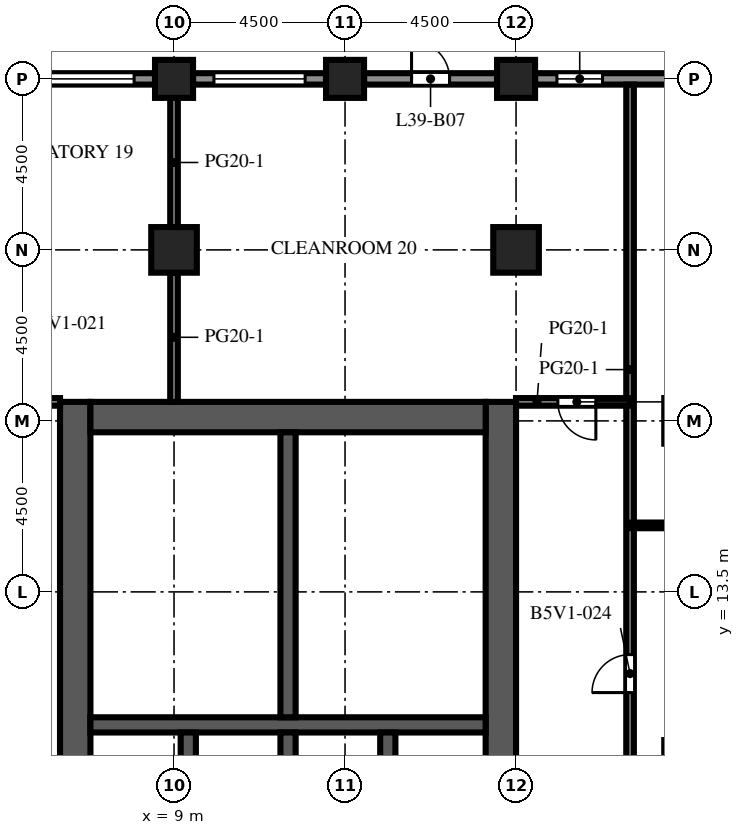
"""IFC4 building model, lengths in metres.
Left out: names, types, materials, properties, quantities, classifications, styles, units other than length and angle.
Written with IfcOpenShell. Run it as: python <this file> out.ifc"""

import sys

from ifc_helpers import new_model, si_unit, direction, frame, frame_2d, origin, origin_2d, place, context, subcontext, project, spatial, rectangle, extrude, element, fill, save


model = new_model("IFC4")
c1 = context("Model", 3, precision=1e-05, world=origin(), true_north=direction((0.0, 1.0)))
c2 = subcontext(c1, "Body", "Model", "MODEL_VIEW")
j1 = project(units=[si_unit("LENGTHUNIT", "METRE"), si_unit("PLANEANGLEUNIT", "RADIAN")], contexts=[c1])
p1 = place(None, origin())
s1 = spatial("IfcSite", under=j1, at=p1, CompositionType="ELEMENT")
p2 = place(p1, origin())
s2 = spatial("IfcBuilding", under=s1, at=p2, CompositionType="ELEMENT")
p3 = place(p2, frame((0.0, 0.0, 173.2)))
s3 = spatial("IfcBuildingStorey", under=s2, at=p3, CompositionType="ELEMENT", Elevation=173.2)
for number, where, z_axis, x_axis in (
    (1, (9.0, 27.0, 0.0), (0.0, 0.0, 1.0), (1.0, 0.0, 0.0)),
    (2, (13.5, 27.0, 0.0), (0.0, 0.0, 1.0), (1.0, 0.0, 0.0)),
    (3, (18.0, 27.0, 0.0), (0.0, 0.0, 1.0), (1.0, 0.0, 0.0)),
):
    element("IfcColumn", number, at=place(p3, frame(where, z_axis=z_axis, x_axis=x_axis)), inside=s3, PredefinedType="COLUMN", context=c2, shape_type="SweptSolid", body=[
        extrude(rectangle(XDim=1.0, YDim=1.0, at=origin_2d()), origin(), (0.0, 0.0, 1.0), 4.1),
    ])
for number, where, z_axis, x_axis in (
    (4, (9.0, 22.5, 0.0), (0.0, 0.0, 1.0), (1.0, 0.0, 0.0)),
    (5, (18.0, 22.5, 0.0), (0.0, 0.0, 1.0), (1.0, 0.0, 0.0)),
):
    element("IfcColumn", number, at=place(p3, frame(where, z_axis=z_axis, x_axis=x_axis)), inside=s3, PredefinedType="COLUMN", context=c2, shape_type="SweptSolid", body=[
        extrude(rectangle(XDim=1.2, YDim=1.2, at=origin_2d()), origin(), (0.0, 0.0, 1.0), 4.1),
    ])
p4 = place(p3, frame((6.4, -9.0, 0.0), z_axis=(0.0, 0.0, 1.0), x_axis=(0.0, 1.0, 0.0)))
e6 = element("IfcWall", 6, at=p4, inside=s3, PredefinedType="SHEAR", context=c2, shape_type="SweptSolid", body=[
    extrude(rectangle(XDim=27.5, YDim=0.8, at=frame_2d((13.75, 0.0))), origin(), (0.0, 0.0, 1.0), 4.1),
])
p5 = place(p4, frame((12.55, 0.0, 0.0)))
e7 = element("IfcOpeningElement", 7, at=p5, cuts=e6, PredefinedType="OPENING", context=c2, shape_type="SweptSolid", body=[
    extrude(rectangle(XDim=2.4, YDim=2.4, at=frame_2d((1.2, 1.2))), frame((0.0, 0.41, 0.0), z_axis=(0.0, -1.0, 0.0), x_axis=(1.0, 0.0, 0.0)), (0.0, 0.0, 1.0), 0.82),
])
p6 = place(p4, frame((3.95, 0.0, 0.0)))
e8 = element("IfcOpeningElement", 8, at=p6, cuts=e6, PredefinedType="OPENING", context=c2, shape_type="SweptSolid", body=[
    extrude(rectangle(XDim=1.2, YDim=2.1, at=frame_2d((0.6, 1.05))), frame((0.0, 0.41, 0.0), z_axis=(0.0, -1.0, 0.0), x_axis=(1.0, 0.0, 0.0)), (0.0, 0.0, 1.0), 0.82),
])
p7 = place(p4, frame((22.35, 0.0, 0.0)))
e9 = element("IfcOpeningElement", 9, at=p7, cuts=e6, PredefinedType="OPENING", context=c2, shape_type="SweptSolid", body=[
    extrude(rectangle(XDim=1.2, YDim=2.1, at=frame_2d((0.6, 1.05))), frame((0.0, 0.41, 0.0), z_axis=(0.0, -1.0, 0.0), x_axis=(1.0, 0.0, 0.0)), (0.0, 0.0, 1.0), 0.82),
])
p8 = place(p3, frame((17.6, -9.0, 0.0), z_axis=(0.0, 0.0, 1.0), x_axis=(0.0, 1.0, 0.0)))
e10 = element("IfcWall", 10, at=p8, inside=s3, PredefinedType="SHEAR", context=c2, shape_type="SweptSolid", body=[
    extrude(rectangle(XDim=27.5, YDim=0.8, at=frame_2d((13.75, 0.0))), origin(), (0.0, 0.0, 1.0), 4.1),
])
p9 = place(p8, frame((12.55, 0.0, 0.0)))
e11 = element("IfcOpeningElement", 11, at=p9, cuts=e10, PredefinedType="OPENING", context=c2, shape_type="SweptSolid", body=[
    extrude(rectangle(XDim=2.4, YDim=2.4, at=frame_2d((1.2, 1.2))), frame((0.0, 0.41, 0.0), z_axis=(0.0, -1.0, 0.0), x_axis=(1.0, 0.0, 0.0)), (0.0, 0.0, 1.0), 0.82),
])
p10 = place(p8, frame((6.825, 0.0, 0.0)))
e12 = element("IfcOpeningElement", 12, at=p10, cuts=e10, PredefinedType="OPENING", context=c2, shape_type="SweptSolid", body=[
    extrude(rectangle(XDim=1.2, YDim=2.1, at=frame_2d((0.6, 1.05))), frame((0.0, 0.41, 0.0), z_axis=(0.0, -1.0, 0.0), x_axis=(1.0, 0.0, 0.0)), (0.0, 0.0, 1.0), 0.82),
])
p11 = place(p8, frame((19.475, 0.0, 0.0)))
e13 = element("IfcOpeningElement", 13, at=p11, cuts=e10, PredefinedType="OPENING", context=c2, shape_type="SweptSolid", body=[
    extrude(rectangle(XDim=1.2, YDim=2.1, at=frame_2d((0.6, 1.05))), frame((0.0, 0.41, 0.0), z_axis=(0.0, -1.0, 0.0), x_axis=(1.0, 0.0, 0.0)), (0.0, 0.0, 1.0), 0.82),
])
p12 = place(p3, frame((6.8, 18.1, 0.0), z_axis=(0.0, 0.0, 1.0), x_axis=(1.0, 0.0, 0.0)))
e14 = element("IfcWall", 14, at=p12, inside=s3, PredefinedType="SHEAR", context=c2, shape_type="SweptSolid", body=[
    extrude(rectangle(XDim=10.4, YDim=0.8, at=frame_2d((5.2, 0.0))), origin(), (0.0, 0.0, 1.0), 4.1),
])
p13 = place(p3, frame((6.8, 10.0, 0.0), z_axis=(0.0, 0.0, 1.0), x_axis=(1.0, 0.0, 0.0)))
e15 = element("IfcWall", 15, at=p13, inside=s3, PredefinedType="SHEAR", context=c2, shape_type="SweptSolid", body=[
    extrude(rectangle(XDim=10.4, YDim=0.4, at=frame_2d((5.2, 0.0))), origin(), (0.0, 0.0, 1.0), 4.1),
])
for number, where, z_axis, x_axis in (
    (16, (9.375, 6.9, 0.0), (0.0, 0.0, 1.0), (0.0, 1.0, 0.0)),
    (17, (12.0, 6.9, 0.0), (0.0, 0.0, 1.0), (0.0, 1.0, 0.0)),
    (18, (14.625, 6.9, 0.0), (0.0, 0.0, 1.0), (0.0, 1.0, 0.0)),
):
    element("IfcWall", number, at=place(p3, frame(where, z_axis=z_axis, x_axis=x_axis)), inside=s3, PredefinedType="SHEAR", context=c2, shape_type="SweptSolid", body=[
        extrude(rectangle(XDim=2.9, YDim=0.4, at=frame_2d((1.45, 0.0))), origin(), (0.0, 0.0, 1.0), 4.1),
    ])
p14 = place(p3, frame((12.0, 10.2, 0.0), z_axis=(0.0, 0.0, 1.0), x_axis=(0.0, 1.0, 0.0)))
e19 = element("IfcWall", 19, at=p14, inside=s3, PredefinedType="SHEAR", context=c2, shape_type="SweptSolid", body=[
    extrude(rectangle(XDim=7.5, YDim=0.4, at=frame_2d((3.75, 0.0))), origin(), (0.0, 0.0, 1.0), 4.1),
])
p15 = place(p3, frame((18.5, 27.0, 0.0), z_axis=(0.0, 0.0, 1.0), x_axis=(1.0, 0.0, 0.0)))
e20 = element("IfcWall", 20, at=p15, inside=s3, PredefinedType="SOLIDWALL", context=c2, shape_type="SweptSolid", body=[
    extrude(rectangle(XDim=3.5, YDim=0.3, at=frame_2d((1.75, 0.0))), origin(), (0.0, 0.0, 1.0), 2.85),
])
p16 = place(p15, frame((0.575, 0.0, 0.8)))
e21 = element("IfcOpeningElement", 21, at=p16, cuts=e20, PredefinedType="OPENING", context=c2, shape_type="SweptSolid", body=[
    extrude(rectangle(XDim=1.2, YDim=1.7, at=frame_2d((0.6, 0.85))), frame((0.0, 0.16, 0.0), z_axis=(0.0, -1.0, 0.0), x_axis=(1.0, 0.0, 0.0)), (0.0, 0.0, 1.0), 0.32),
])
p17 = place(p3, frame((14.0, 27.0, 0.0), z_axis=(0.0, 0.0, 1.0), x_axis=(1.0, 0.0, 0.0)))
e22 = element("IfcWall", 22, at=p17, inside=s3, PredefinedType="SOLIDWALL", context=c2, shape_type="SweptSolid", body=[
    extrude(rectangle(XDim=3.5, YDim=0.3, at=frame_2d((1.75, 0.0))), origin(), (0.0, 0.0, 1.0), 2.85),
])
p18 = place(p17, frame((1.25, 0.0, 0.0)))
e23 = element("IfcOpeningElement", 23, at=p18, cuts=e22, PredefinedType="OPENING", context=c2, shape_type="SweptSolid", body=[
    extrude(rectangle(XDim=1.0, YDim=2.2, at=frame_2d((0.5, 1.1))), frame((0.0, 0.16, 0.0), z_axis=(0.0, -1.0, 0.0), x_axis=(1.0, 0.0, 0.0)), (0.0, 0.0, 1.0), 0.32),
])
p19 = place(p3, frame((9.5, 27.0, 0.0), z_axis=(0.0, 0.0, 1.0), x_axis=(1.0, 0.0, 0.0)))
e24 = element("IfcWall", 24, at=p19, inside=s3, PredefinedType="SOLIDWALL", context=c2, shape_type="SweptSolid", body=[
    extrude(rectangle(XDim=3.5, YDim=0.3, at=frame_2d((1.75, 0.0))), origin(), (0.0, 0.0, 1.0), 2.85),
])
p20 = place(p19, frame((0.55, 0.0, 0.8)))
e25 = element("IfcOpeningElement", 25, at=p20, cuts=e24, PredefinedType="OPENING", context=c2, shape_type="SweptSolid", body=[
    extrude(rectangle(XDim=2.4, YDim=1.7, at=frame_2d((1.2, 0.85))), frame((0.0, 0.16, 0.0), z_axis=(0.0, -1.0, 0.0), x_axis=(1.0, 0.0, 0.0)), (0.0, 0.0, 1.0), 0.32),
])
p21 = place(p3, frame((5.0, 27.0, 0.0), z_axis=(0.0, 0.0, 1.0), x_axis=(1.0, 0.0, 0.0)))
e26 = element("IfcWall", 26, at=p21, inside=s3, PredefinedType="SOLIDWALL", context=c2, shape_type="SweptSolid", body=[
    extrude(rectangle(XDim=3.5, YDim=0.3, at=frame_2d((1.75, 0.0))), origin(), (0.0, 0.0, 1.0), 2.85),
])
p22 = place(p21, frame((0.55, 0.0, 0.8)))
e27 = element("IfcOpeningElement", 27, at=p22, cuts=e26, PredefinedType="OPENING", context=c2, shape_type="SweptSolid", body=[
    extrude(rectangle(XDim=2.4, YDim=1.7, at=frame_2d((1.2, 0.85))), frame((0.0, 0.16, 0.0), z_axis=(0.0, -1.0, 0.0), x_axis=(1.0, 0.0, 0.0)), (0.0, 0.0, 1.0), 0.32),
])
p23 = place(p3, frame((8.2, 10.2, 0.0), z_axis=(0.0, 0.0, 1.0), x_axis=(0.0, 1.0, 0.0)))
e28 = element("IfcWall", 28, at=p23, inside=s3, PredefinedType="PARTITIONING", context=c2, shape_type="SweptSolid", body=[
    extrude(rectangle(XDim=2.25, YDim=0.1, at=frame_2d((1.125, 0.0))), origin(), (0.0, 0.0, 1.0), 3.65),
])
p24 = place(p23, frame((0.625, 0.0, 0.0)))
e29 = element("IfcOpeningElement", 29, at=p24, cuts=e28, PredefinedType="OPENING", context=c2, shape_type="SweptSolid", body=[
    extrude(rectangle(XDim=1.0, YDim=2.1, at=frame_2d((0.5, 1.05))), frame((0.0, 0.06, 0.0), z_axis=(0.0, -1.0, 0.0), x_axis=(1.0, 0.0, 0.0)), (0.0, 0.0, 1.0), 0.12),
])
p25 = place(p3, frame((8.2, 12.45, 0.0), z_axis=(0.0, 0.0, 1.0), x_axis=(0.0, 1.0, 0.0)))
e30 = element("IfcWall", 30, at=p25, inside=s3, PredefinedType="PARTITIONING", context=c2, shape_type="SweptSolid", body=[
    extrude(rectangle(XDim=2.4, YDim=0.1, at=frame_2d((1.2, 0.0))), origin(), (0.0, 0.0, 1.0), 3.65),
])
p26 = place(p25, frame((0.7, 0.0, 0.0)))
e31 = element("IfcOpeningElement", 31, at=p26, cuts=e30, PredefinedType="OPENING", context=c2, shape_type="SweptSolid", body=[
    extrude(rectangle(XDim=1.0, YDim=2.1, at=frame_2d((0.5, 1.05))), frame((0.0, 0.06, 0.0), z_axis=(0.0, -1.0, 0.0), x_axis=(1.0, 0.0, 0.0)), (0.0, 0.0, 1.0), 0.12),
])
p27 = place(p3, frame((8.2, 14.85, 0.0), z_axis=(0.0, 0.0, 1.0), x_axis=(0.0, 1.0, 0.0)))
e32 = element("IfcWall", 32, at=p27, inside=s3, PredefinedType="PARTITIONING", context=c2, shape_type="SweptSolid", body=[
    extrude(rectangle(XDim=2.85, YDim=0.1, at=frame_2d((1.425, 0.0))), origin(), (0.0, 0.0, 1.0), 3.65),
])
p28 = place(p27, frame((0.925, 0.0, 0.0)))
e33 = element("IfcOpeningElement", 33, at=p28, cuts=e32, PredefinedType="OPENING", context=c2, shape_type="SweptSolid", body=[
    extrude(rectangle(XDim=1.0, YDim=2.1, at=frame_2d((0.5, 1.05))), frame((0.0, 0.06, 0.0), z_axis=(0.0, -1.0, 0.0), x_axis=(1.0, 0.0, 0.0)), (0.0, 0.0, 1.0), 0.12),
])
for number, where, z_axis, x_axis in (
    (34, (8.2, 12.45, 0.0), (0.0, 0.0, 1.0), (1.0, 0.0, 0.0)),
    (35, (8.2, 14.85, 0.0), (0.0, 0.0, 1.0), (1.0, 0.0, 0.0)),
):
    element("IfcWall", number, at=place(p3, frame(where, z_axis=z_axis, x_axis=x_axis)), inside=s3, PredefinedType="PARTITIONING", context=c2, shape_type="SweptSolid", body=[
        extrude(rectangle(XDim=3.6, YDim=0.1, at=frame_2d((1.8, 0.0))), origin(), (0.0, 0.0, 1.0), 3.65),
    ])
for number, where, z_axis, x_axis in (
    (36, (9.0, 18.5, 0.0), (0.0, 0.0, 1.0), (0.0, 1.0, 0.0)),
    (37, (9.0, 23.1, 0.0), (0.0, 0.0, 1.0), (0.0, 1.0, 0.0)),
):
    element("IfcWall", number, at=place(p3, frame(where, z_axis=z_axis, x_axis=x_axis)), inside=s3, PredefinedType="PARTITIONING", context=c2, shape_type="SweptSolid", body=[
        extrude(rectangle(XDim=3.4, YDim=0.2, at=frame_2d((1.7, 0.0))), origin(), (0.0, 0.0, 1.0), 3.65),
    ])
p29 = place(p3, frame((21.0, 26.85, 0.0), z_axis=(0.0, 0.0, 1.0), x_axis=(0.0, -1.0, 0.0)))
e38 = element("IfcWall", 38, at=p29, inside=s3, PredefinedType="PARTITIONING", context=c2, shape_type="SweptSolid", body=[
    extrude(rectangle(XDim=20.6, YDim=0.2, at=frame_2d((10.3, 0.0))), origin(), (0.0, 0.0, 1.0), 3.65),
])
p30 = place(p29, frame((15.0, 0.0, 0.0)))
e39 = element("IfcOpeningElement", 39, at=p30, cuts=e38, PredefinedType="OPENING", context=c2, shape_type="SweptSolid", body=[
    extrude(rectangle(XDim=1.0, YDim=2.1, at=frame_2d((0.5, 1.05))), frame((0.0, 0.11, 0.0), z_axis=(0.0, -1.0, 0.0), x_axis=(1.0, 0.0, 0.0)), (0.0, 0.0, 1.0), 0.22),
])
p31 = place(p3, frame((21.0, 15.25, 0.0), z_axis=(0.0, 0.0, 1.0), x_axis=(1.0, 0.0, 0.0)))
e40 = element("IfcWall", 40, at=p31, inside=s3, PredefinedType="PARTITIONING", context=c2, shape_type="SweptSolid", body=[
    extrude(rectangle(XDim=5.85, YDim=0.15, at=frame_2d((2.925, 0.0))), origin(), (0.0, 0.0, 1.0), 3.65),
])
p32 = place(p31, frame((3.1, 0.0, 0.0)))
e41 = element("IfcOpeningElement", 41, at=p32, cuts=e40, PredefinedType="OPENING", context=c2, shape_type="SweptSolid", body=[
    extrude(rectangle(XDim=1.0, YDim=2.1, at=frame_2d((0.5, 1.05))), frame((0.0, 0.085, 0.0), z_axis=(0.0, -1.0, 0.0), x_axis=(1.0, 0.0, 0.0)), (0.0, 0.0, 1.0), 0.17),
])
p33 = place(p3, frame((1.5, 18.5, 0.0), z_axis=(0.0, 0.0, 1.0), x_axis=(1.0, 0.0, 0.0)))
e42 = element("IfcWall", 42, at=p33, inside=s3, PredefinedType="PARTITIONING", context=c2, shape_type="SweptSolid", body=[
    extrude(rectangle(XDim=4.5, YDim=0.2, at=frame_2d((2.25, 0.0))), origin(), (0.0, 0.0, 1.0), 3.65),
])
p34 = place(p33, frame((2.1, 0.0, 0.0)))
e43 = element("IfcOpeningElement", 43, at=p34, cuts=e42, PredefinedType="OPENING", context=c2, shape_type="SweptSolid", body=[
    extrude(rectangle(XDim=1.0, YDim=2.1, at=frame_2d((0.5, 1.05))), frame((0.0, 0.11, 0.0), z_axis=(0.0, -1.0, 0.0), x_axis=(1.0, 0.0, 0.0)), (0.0, 0.0, 1.0), 0.22),
])
p35 = place(p3, frame((18.0, 18.5, 0.0), z_axis=(0.0, 0.0, 1.0), x_axis=(1.0, 0.0, 0.0)))
e44 = element("IfcWall", 44, at=p35, inside=s3, PredefinedType="PARTITIONING", context=c2, shape_type="SweptSolid", body=[
    extrude(rectangle(XDim=3.0, YDim=0.2, at=frame_2d((1.5, 0.0))), origin(), (0.0, 0.0, 1.0), 3.65),
])
p36 = place(p35, frame((1.1, 0.0, 0.0)))
e45 = element("IfcOpeningElement", 45, at=p36, cuts=e44, PredefinedType="OPENING", context=c2, shape_type="SweptSolid", body=[
    extrude(rectangle(XDim=1.0, YDim=2.1, at=frame_2d((0.5, 1.05))), frame((0.0, 0.11, 0.0), z_axis=(0.0, -1.0, 0.0), x_axis=(1.0, 0.0, 0.0)), (0.0, 0.0, 1.0), 0.22),
])
p37 = place(p16, origin())
e46 = element("IfcWindow", 46, at=p37, inside=s3, PartitioningType="SINGLE_PANEL", PredefinedType="WINDOW", context=c2, shape_type="SweptSolid", body=[
    extrude(rectangle(XDim=1.2, YDim=1.7, at=frame_2d((0.6, 0.85))), frame((0.0, 0.03, 0.0), z_axis=(0.0, -1.0, 0.0), x_axis=(1.0, 0.0, 0.0)), (0.0, 0.0, 1.0), 0.06),
])
fill(e21, e46)
p38 = place(p18, origin())
e47 = element("IfcDoor", 47, at=p38, inside=s3, OperationType="SINGLE_SWING_LEFT", PredefinedType="DOOR", context=c2, shape_type="SweptSolid", body=[
    extrude(rectangle(XDim=1.0, YDim=2.2, at=frame_2d((0.5, 1.1))), frame((0.0, 0.025, 0.0), z_axis=(0.0, -1.0, 0.0), x_axis=(1.0, 0.0, 0.0)), (0.0, 0.0, 1.0), 0.05),
])
fill(e23, e47)
p39 = place(p20, origin())
e48 = element("IfcWindow", 48, at=p39, inside=s3, PartitioningType="SINGLE_PANEL", PredefinedType="WINDOW", context=c2, shape_type="SweptSolid", body=[
    extrude(rectangle(XDim=2.4, YDim=1.7, at=frame_2d((1.2, 0.85))), frame((0.0, 0.03, 0.0), z_axis=(0.0, -1.0, 0.0), x_axis=(1.0, 0.0, 0.0)), (0.0, 0.0, 1.0), 0.06),
])
fill(e25, e48)
p40 = place(p22, origin())
e49 = element("IfcWindow", 49, at=p40, inside=s3, PartitioningType="SINGLE_PANEL", PredefinedType="WINDOW", context=c2, shape_type="SweptSolid", body=[
    extrude(rectangle(XDim=2.4, YDim=1.7, at=frame_2d((1.2, 0.85))), frame((0.0, 0.03, 0.0), z_axis=(0.0, -1.0, 0.0), x_axis=(1.0, 0.0, 0.0)), (0.0, 0.0, 1.0), 0.06),
])
fill(e27, e49)
p41 = place(p11, frame((1.2, 0.0, 0.0), z_axis=(0.0, 0.0, 1.0), x_axis=(-1.0, 0.0, 0.0)))
e50 = element("IfcDoor", 50, at=p41, inside=s3, OperationType="SINGLE_SWING_LEFT", PredefinedType="DOOR", context=c2, shape_type="SweptSolid", body=[
    extrude(rectangle(XDim=1.2, YDim=2.1, at=frame_2d((0.6, 1.05))), frame((0.0, 0.025, 0.0), z_axis=(0.0, -1.0, 0.0), x_axis=(1.0, 0.0, 0.0)), (0.0, 0.0, 1.0), 0.05),
])
fill(e13, e50)
p42 = place(p7, origin())
e51 = element("IfcDoor", 51, at=p42, inside=s3, OperationType="SINGLE_SWING_RIGHT", PredefinedType="DOOR", context=c2, shape_type="SweptSolid", body=[
    extrude(rectangle(XDim=1.2, YDim=2.1, at=frame_2d((0.6, 1.05))), frame((0.0, -0.325, 0.0), z_axis=(0.0, -1.0, 0.0), x_axis=(1.0, 0.0, 0.0)), (0.0, 0.0, 1.0), 0.05),
])
fill(e9, e51)
p43 = place(p24, origin())
e52 = element("IfcDoor", 52, at=p43, inside=s3, OperationType="SINGLE_SWING_LEFT", PredefinedType="DOOR", context=c2, shape_type="SweptSolid", body=[
    extrude(rectangle(XDim=1.0, YDim=2.1, at=frame_2d((0.5, 1.05))), frame((0.0, 0.025, 0.0), z_axis=(0.0, -1.0, 0.0), x_axis=(1.0, 0.0, 0.0)), (0.0, 0.0, 1.0), 0.05),
])
fill(e29, e52)
p44 = place(p26, origin())
e53 = element("IfcDoor", 53, at=p44, inside=s3, OperationType="SINGLE_SWING_RIGHT", PredefinedType="DOOR", context=c2, shape_type="SweptSolid", body=[
    extrude(rectangle(XDim=1.0, YDim=2.1, at=frame_2d((0.5, 1.05))), frame((0.0, 0.025, 0.0), z_axis=(0.0, -1.0, 0.0), x_axis=(1.0, 0.0, 0.0)), (0.0, 0.0, 1.0), 0.05),
])
fill(e31, e53)
p45 = place(p28, origin())
e54 = element("IfcDoor", 54, at=p45, inside=s3, OperationType="SINGLE_SWING_LEFT", PredefinedType="DOOR", context=c2, shape_type="SweptSolid", body=[
    extrude(rectangle(XDim=1.0, YDim=2.1, at=frame_2d((0.5, 1.05))), frame((0.0, 0.025, 0.0), z_axis=(0.0, -1.0, 0.0), x_axis=(1.0, 0.0, 0.0)), (0.0, 0.0, 1.0), 0.05),
])
fill(e33, e54)
p46 = place(p36, origin())
e55 = element("IfcDoor", 55, at=p46, inside=s3, OperationType="SINGLE_SWING_RIGHT", PredefinedType="DOOR", context=c2, shape_type="SweptSolid", body=[
    extrude(rectangle(XDim=1.0, YDim=2.1, at=frame_2d((0.5, 1.05))), frame((0.0, 0.025, 0.0), z_axis=(0.0, -1.0, 0.0), x_axis=(1.0, 0.0, 0.0)), (0.0, 0.0, 1.0), 0.05),
])
fill(e45, e55)
p47 = place(p30, origin())
e56 = element("IfcDoor", 56, at=p47, inside=s3, OperationType="SINGLE_SWING_RIGHT", PredefinedType="DOOR", context=c2, shape_type="SweptSolid", body=[
    extrude(rectangle(XDim=1.0, YDim=2.1, at=frame_2d((0.5, 1.05))), frame((0.0, 0.025, 0.0), z_axis=(0.0, -1.0, 0.0), x_axis=(1.0, 0.0, 0.0)), (0.0, 0.0, 1.0), 0.05),
])
fill(e39, e56)
save(model, sys.argv[1])
